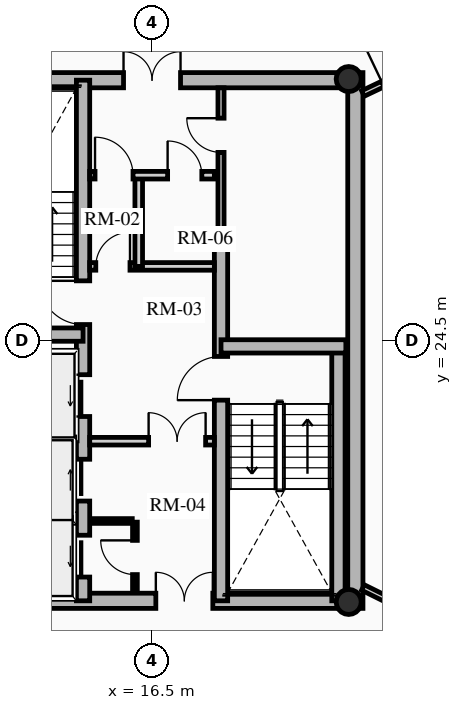
"""IFC4 building model, lengths in metres.
Left out: names, types, materials, properties, quantities, classifications, styles, units other than length and angle.
Written with IfcOpenShell. Run it as: python <this file> out.ifc"""

import sys

from ifc_helpers import new_model, si_unit, direction, frame, frame_2d, origin, origin_2d, place, context, subcontext, project, spatial, rectangle, hollow_circle, extrude, source, transform, mapped, element, fill, save


model = new_model("IFC4")
c1 = context("Model", 3, precision=1e-05, world=origin(), true_north=direction((0.0, 1.0)))
c2 = subcontext(c1, "Body", "Model", "MODEL_VIEW")
j1 = project(units=[si_unit("LENGTHUNIT", "METRE"), si_unit("PLANEANGLEUNIT", "RADIAN")], contexts=[c1])
p1 = place(None, origin())
s1 = spatial("IfcSite", under=j1, at=p1, CompositionType="ELEMENT")
p2 = place(p1, origin())
s2 = spatial("IfcBuilding", under=s1, at=p2, CompositionType="ELEMENT")
p3 = place(p2, frame((0.0, 0.0, 196.66)))
s3 = spatial("IfcBuildingStorey", under=s2, at=p3, CompositionType="ELEMENT", Elevation=196.66)
p4 = place(p3, frame((21.85, 17.45, 0.0), z_axis=(0.0, 0.0, 1.0), x_axis=(0.0, 1.0, 0.0)))
e1 = element("IfcWall", 1, at=p4, inside=s3, PredefinedType="SHEAR", context=c2, shape_type="SweptSolid", body=[
    extrude(rectangle(XDim=14.1, YDim=0.4, at=frame_2d((7.05, 0.0))), origin(), (0.0, 0.0, 1.0), 2.91),
])
p5 = place(p3, frame((11.15, 17.65, 0.0), z_axis=(0.0, 0.0, 1.0), x_axis=(1.0, 0.0, 0.0)))
e2 = element("IfcWall", 2, at=p5, inside=s3, PredefinedType="SHEAR", context=c2, shape_type="SweptSolid", body=[
    extrude(rectangle(XDim=10.7, YDim=0.4, at=frame_2d((5.35, 0.0))), origin(), (0.0, 0.0, 1.0), 2.91),
])
m1 = source(origin(), c2, "Body", "SweptSolid", [
    extrude(rectangle(XDim=1.5, YDim=2.02, at=frame_2d((0.75, 1.01))), frame((0.0, 0.21, 0.0), z_axis=(0.0, -1.0, 0.0), x_axis=(1.0, 0.0, 0.0)), (0.0, 0.0, 1.0), 0.42),
])
p6 = place(p5, frame((5.45, 0.0, 0.0)))
e3 = element("IfcOpeningElement", 3, at=p6, cuts=e2, PredefinedType="OPENING", context=c2, shape_type="MappedRepresentation", body=[
    mapped(m1, transform((0.0, 0.0, 0.0), x_axis=(1.0, 0.0, 0.0), y_axis=(0.0, 1.0, 0.0), z_axis=(0.0, 0.0, 1.0), scale=1.0)),
])
p7 = place(p3, frame((11.15, 31.35, 0.0), z_axis=(0.0, 0.0, 1.0), x_axis=(1.0, 0.0, 0.0)))
e4 = element("IfcWall", 4, at=p7, inside=s3, PredefinedType="SHEAR", context=c2, shape_type="SweptSolid", body=[
    extrude(rectangle(XDim=10.7, YDim=0.4, at=frame_2d((5.35, 0.0))), origin(), (0.0, 0.0, 1.0), 2.91),
])
p8 = place(p7, frame((4.6, 0.0, 0.0)))
e5 = element("IfcOpeningElement", 5, at=p8, cuts=e4, PredefinedType="OPENING", context=c2, shape_type="MappedRepresentation", body=[
    mapped(m1, transform((0.0, 0.0, 0.0), x_axis=(1.0, 0.0, 0.0), y_axis=(0.0, 1.0, 0.0), z_axis=(0.0, 0.0, 1.0), scale=1.0)),
])
p9 = place(p3, frame((14.685, 17.65, 0.0), z_axis=(0.0, 0.0, 1.0), x_axis=(0.0, 1.0, 0.0)))
e6 = element("IfcWall", 6, at=p9, inside=s3, PredefinedType="SHEAR", context=c2, shape_type="SweptSolid", body=[
    extrude(rectangle(XDim=13.7, YDim=0.35, at=frame_2d((6.85, 0.0))), origin(), (0.0, 0.0, 1.0), 2.91),
])
m2 = source(origin(), c2, "Body", "SweptSolid", [
    extrude(rectangle(XDim=1.1, YDim=2.015, at=frame_2d((0.55, 1.007))), frame((0.0, 0.185, 0.0), z_axis=(0.0, -1.0, 0.0), x_axis=(1.0, 0.0, 0.0)), (0.0, 0.0, 1.0), 0.37),
])
p10 = place(p9, frame((4.85, 0.0, 0.0)))
e7 = element("IfcOpeningElement", 7, at=p10, cuts=e6, PredefinedType="OPENING", context=c2, shape_type="MappedRepresentation", body=[
    mapped(m2, transform((0.0, 0.0, 0.0), x_axis=(1.0, 0.0, 0.0), y_axis=(0.0, 1.0, 0.0), z_axis=(0.0, 0.0, 1.0), scale=1.0)),
])
p11 = place(p9, frame((0.625, 0.0, 0.0)))
e8 = element("IfcOpeningElement", 8, at=p11, cuts=e6, PredefinedType="OPENING", context=c2, shape_type="MappedRepresentation", body=[
    mapped(m2, transform((0.0, 0.0, 0.0), x_axis=(1.0, 0.0, 0.0), y_axis=(0.0, 1.0, 0.0), z_axis=(0.0, 0.0, 1.0), scale=1.0)),
])
p12 = place(p9, frame((2.625, 0.0, 0.0)))
e9 = element("IfcOpeningElement", 9, at=p12, cuts=e6, PredefinedType="OPENING", context=c2, shape_type="MappedRepresentation", body=[
    mapped(m2, transform((0.0, 0.0, 0.0), x_axis=(1.0, 0.0, 0.0), y_axis=(0.0, 1.0, 0.0), z_axis=(0.0, 0.0, 1.0), scale=1.0)),
])
m3 = source(origin(), c2, "Body", "SweptSolid", [
    extrude(rectangle(XDim=1.15, YDim=2.02, at=frame_2d((0.575, 1.01))), frame((0.0, 0.185, 0.0), z_axis=(0.0, -1.0, 0.0), x_axis=(1.0, 0.0, 0.0)), (0.0, 0.0, 1.0), 0.37),
])
p13 = place(p9, frame((7.27, 0.0, 0.0)))
e10 = element("IfcOpeningElement", 10, at=p13, cuts=e6, PredefinedType="OPENING", context=c2, shape_type="MappedRepresentation", body=[
    mapped(m3, transform((0.0, 0.0, 0.0), x_axis=(1.0, 0.0, 0.0), y_axis=(0.0, 1.0, 0.0), z_axis=(0.0, 0.0, 1.0), scale=1.0)),
])
p14 = place(p3, frame((18.315, 17.65, 0.0), z_axis=(0.0, 0.0, 1.0), x_axis=(0.0, 1.0, 0.0)))
e11 = element("IfcWall", 11, at=p14, inside=s3, PredefinedType="SHEAR", context=c2, shape_type="SweptSolid", body=[
    extrude(rectangle(XDim=9.6, YDim=0.35, at=frame_2d((4.8, 0.0))), origin(), (0.0, 0.0, 1.0), 2.91),
])
p15 = place(p14, frame((5.28, 0.0, 0.0)))
e12 = element("IfcOpeningElement", 12, at=p15, cuts=e11, PredefinedType="OPENING", context=c2, shape_type="MappedRepresentation", body=[
    mapped(m3, transform((0.0, 0.0, 0.0), x_axis=(1.0, 0.0, 0.0), y_axis=(0.0, 1.0, 0.0), z_axis=(0.0, 0.0, 1.0), scale=1.0)),
])
p16 = place(p3, frame((11.4, 24.655, 0.0), z_axis=(0.0, 0.0, 1.0), x_axis=(1.0, 0.0, 0.0)))
e13 = element("IfcWall", 13, at=p16, inside=s3, PredefinedType="SHEAR", context=c2, shape_type="SweptSolid", body=[
    extrude(rectangle(XDim=3.285, YDim=0.35, at=frame_2d((1.643, 0.0))), origin(), (0.0, 0.0, 1.0), 2.91),
])
p17 = place(p3, frame((21.405, 17.65, 0.0), z_axis=(0.0, 0.0, 1.0), x_axis=(0.0, 1.0, 0.0)))
e14 = element("IfcWall", 14, at=p17, inside=s3, PredefinedType="SHEAR", context=c2, shape_type="SweptSolid", body=[
    extrude(rectangle(XDim=6.695, YDim=0.35, at=frame_2d((3.348, 0.0))), origin(), (0.0, 0.0, 1.0), 2.91),
])
p18 = place(p3, frame((18.315, 24.345, 0.0), z_axis=(0.0, 0.0, 1.0), x_axis=(1.0, 0.0, 0.0)))
e15 = element("IfcWall", 15, at=p18, inside=s3, PredefinedType="SHEAR", context=c2, shape_type="SweptSolid", body=[
    extrude(rectangle(XDim=3.285, YDim=0.35, at=frame_2d((1.643, 0.0))), origin(), (0.0, 0.0, 1.0), 2.91),
])
for number, where, z_axis, x_axis in (
    (16, (21.675, 17.62, 0.0), (0.0, 0.0, 1.0), (1.0, 0.0, 0.0)),
    (17, (21.675, 31.38, 0.0), (0.0, 0.0, 1.0), (1.0, 0.0, 0.0)),
):
    element("IfcColumn", number, at=place(p3, frame(where, z_axis=z_axis, x_axis=x_axis)), inside=s3, PredefinedType="COLUMN", context=c2, shape_type="SweptSolid", body=[
        extrude(hollow_circle(Radius=0.33, WallThickness=0.025, at=origin_2d()), origin(), (0.0, 0.0, 1.0), 2.91),
    ])
for number, where, z_axis, x_axis in (
    (18, (11.52, 21.8, 0.0), (0.0, 0.0, 1.0), (1.0, 0.0, 0.0)),
    (19, (11.52, 19.825, 0.0), (0.0, 0.0, 1.0), (1.0, 0.0, 0.0)),
):
    element("IfcWall", number, at=place(p3, frame(where, z_axis=z_axis, x_axis=x_axis)), inside=s3, PredefinedType="SHEAR", context=c2, shape_type="SweptSolid", body=[
        extrude(rectangle(XDim=2.97, YDim=0.2, at=frame_2d((1.485, 0.0))), origin(), (0.0, 0.0, 1.0), 2.91),
    ])
p19 = place(p3, frame((14.86, 21.85, 0.0), z_axis=(0.0, 0.0, 1.0), x_axis=(1.0, 0.0, 0.0)))
e20 = element("IfcWall", 20, at=p19, inside=s3, PredefinedType="PARTITIONING", context=c2, shape_type="SweptSolid", body=[
    extrude(rectangle(XDim=3.28, YDim=0.2, at=frame_2d((1.64, 0.0))), origin(), (0.0, 0.0, 1.0), 2.685),
])
m4 = source(origin(), c2, "Body", "SweptSolid", [
    extrude(rectangle(XDim=1.5, YDim=2.02, at=frame_2d((0.75, 1.01))), frame((0.0, 0.11, 0.0), z_axis=(0.0, -1.0, 0.0), x_axis=(1.0, 0.0, 0.0)), (0.0, 0.0, 1.0), 0.22),
])
p20 = place(p19, frame((1.55, 0.0, 0.0)))
e21 = element("IfcOpeningElement", 21, at=p20, cuts=e20, PredefinedType="OPENING", context=c2, shape_type="MappedRepresentation", body=[
    mapped(m4, transform((0.0, 0.0, 0.0), x_axis=(1.0, 0.0, 0.0), y_axis=(0.0, 1.0, 0.0), z_axis=(0.0, 0.0, 1.0), scale=1.0)),
])
p21 = place(p3, frame((14.86, 26.45, 0.0), z_axis=(0.0, 0.0, 1.0), x_axis=(1.0, 0.0, 0.0)))
e22 = element("IfcWall", 22, at=p21, inside=s3, PredefinedType="PARTITIONING", context=c2, shape_type="SweptSolid", body=[
    extrude(rectangle(XDim=3.28, YDim=0.2, at=frame_2d((1.64, 0.0))), origin(), (0.0, 0.0, 1.0), 2.685),
])
m5 = source(origin(), c2, "Body", "SweptSolid", [
    extrude(rectangle(XDim=0.9, YDim=2.005, at=frame_2d((0.45, 1.002))), frame((0.0, 0.11, 0.0), z_axis=(0.0, -1.0, 0.0), x_axis=(1.0, 0.0, 0.0)), (0.0, 0.0, 1.0), 0.22),
])
p22 = place(p21, frame((0.16, 0.0, 0.0)))
e23 = element("IfcOpeningElement", 23, at=p22, cuts=e22, PredefinedType="OPENING", context=c2, shape_type="MappedRepresentation", body=[
    mapped(m5, transform((0.0, 0.0, 0.0), x_axis=(1.0, 0.0, 0.0), y_axis=(0.0, 1.0, 0.0), z_axis=(0.0, 0.0, 1.0), scale=1.0)),
])
p23 = place(p3, frame((16.15, 26.45, 0.0), z_axis=(0.0, 0.0, 1.0), x_axis=(0.0, 1.0, 0.0)))
e24 = element("IfcWall", 24, at=p23, inside=s3, PredefinedType="PARTITIONING", context=c2, shape_type="SweptSolid", body=[
    extrude(rectangle(XDim=2.4, YDim=0.2, at=frame_2d((1.2, 0.0))), origin(), (0.0, 0.0, 1.0), 2.685),
])
p24 = place(p3, frame((14.86, 28.85, 0.0), z_axis=(0.0, 0.0, 1.0), x_axis=(1.0, 0.0, 0.0)))
e25 = element("IfcWall", 25, at=p24, inside=s3, PredefinedType="PARTITIONING", context=c2, shape_type="SweptSolid", body=[
    extrude(rectangle(XDim=3.28, YDim=0.2, at=frame_2d((1.64, 0.0))), origin(), (0.0, 0.0, 1.0), 2.685),
])
m6 = source(origin(), c2, "Body", "SweptSolid", [
    extrude(rectangle(XDim=1.0, YDim=2.015, at=frame_2d((0.5, 1.007))), frame((0.0, 0.11, 0.0), z_axis=(0.0, -1.0, 0.0), x_axis=(1.0, 0.0, 0.0)), (0.0, 0.0, 1.0), 0.22),
])
p25 = place(p24, frame((0.14, 0.0, 0.0)))
e26 = element("IfcOpeningElement", 26, at=p25, cuts=e25, PredefinedType="OPENING", context=c2, shape_type="MappedRepresentation", body=[
    mapped(m6, transform((0.0, 0.0, 0.0), x_axis=(1.0, 0.0, 0.0), y_axis=(0.0, 1.0, 0.0), z_axis=(0.0, 0.0, 1.0), scale=1.0)),
])
p26 = place(p24, frame((2.05, 0.0, 0.0)))
e27 = element("IfcOpeningElement", 27, at=p26, cuts=e25, PredefinedType="OPENING", context=c2, shape_type="MappedRepresentation", body=[
    mapped(m5, transform((0.0, 0.0, 0.0), x_axis=(1.0, 0.0, 0.0), y_axis=(0.0, 1.0, 0.0), z_axis=(0.0, 0.0, 1.0), scale=1.0)),
])
p27 = place(p3, frame((16.05, 17.92, 0.0), z_axis=(0.0, 0.0, 1.0), x_axis=(0.0, 1.0, 0.0)))
e28 = element("IfcWall", 28, at=p27, inside=s3, PredefinedType="PARTITIONING", context=c2, shape_type="SweptSolid", body=[
    extrude(rectangle(XDim=1.8, YDim=0.125, at=frame_2d((0.9, 0.0))), origin(), (0.0, 0.0, 1.0), 2.685),
])
m7 = source(origin(), c2, "Body", "SweptSolid", [
    extrude(rectangle(XDim=0.9, YDim=2.005, at=frame_2d((0.45, 1.002))), frame((0.0, 0.073, 0.0), z_axis=(0.0, -1.0, 0.0), x_axis=(1.0, 0.0, 0.0)), (0.0, 0.0, 1.0), 0.145),
])
p28 = place(p27, frame((0.42, 0.0, 0.0)))
e29 = element("IfcOpeningElement", 29, at=p28, cuts=e28, PredefinedType="OPENING", context=c2, shape_type="MappedRepresentation", body=[
    mapped(m7, transform((0.0, 0.0, 0.0), x_axis=(1.0, 0.0, 0.0), y_axis=(0.0, 1.0, 0.0), z_axis=(0.0, 0.0, 1.0), scale=1.0)),
])
p29 = place(p3, frame((14.88, 19.75, 0.0), z_axis=(0.0, 0.0, 1.0), x_axis=(1.0, 0.0, 0.0)))
e30 = element("IfcWall", 30, at=p29, inside=s3, PredefinedType="PARTITIONING", context=c2, shape_type="SweptSolid", body=[
    extrude(rectangle(XDim=1.1, YDim=0.125, at=frame_2d((0.55, 0.0))), origin(), (0.0, 0.0, 1.0), 2.685),
])
p30 = place(p3, frame((18.315, 27.25, 0.0), z_axis=(0.0, 0.0, 1.0), x_axis=(0.0, 1.0, 0.0)))
e31 = element("IfcWall", 31, at=p30, inside=s3, PredefinedType="PARTITIONING", context=c2, shape_type="SweptSolid", body=[
    extrude(rectangle(XDim=3.9, YDim=0.16, at=frame_2d((1.95, 0.0))), origin(), (0.0, 0.0, 1.0), 2.685),
])
m8 = source(origin(), c2, "Body", "SweptSolid", [
    extrude(rectangle(XDim=0.9, YDim=2.005, at=frame_2d((0.45, 1.002))), frame((0.0, 0.09, 0.0), z_axis=(0.0, -1.0, 0.0), x_axis=(1.0, 0.0, 0.0)), (0.0, 0.0, 1.0), 0.18),
])
p31 = place(p30, frame((2.2, 0.0, 0.0)))
e32 = element("IfcOpeningElement", 32, at=p31, cuts=e31, PredefinedType="OPENING", context=c2, shape_type="MappedRepresentation", body=[
    mapped(m8, transform((0.0, 0.0, 0.0), x_axis=(1.0, 0.0, 0.0), y_axis=(0.0, 1.0, 0.0), z_axis=(0.0, 0.0, 1.0), scale=1.0)),
])
p32 = place(p3, frame((22.05, 31.0, 0.0), z_axis=(0.0, 0.0, 1.0), x_axis=(0.903013459407, 0.429612257891, 0.0)))
e33 = element("IfcWall", 33, at=p32, inside=s3, PredefinedType="PARTITIONING", context=c2, shape_type="SweptSolid", body=[
    extrude(rectangle(XDim=1.829, YDim=0.16, at=frame_2d((0.914, 0.0))), origin(), (0.0, 0.0, 1.0), 2.255),
])
m9 = source(origin(), c2, "Body", "SweptSolid", [
    extrude(rectangle(XDim=1.05, YDim=2.015, at=frame_2d((0.525, 1.007))), frame((0.0, 0.09, 0.0), z_axis=(0.0, -1.0, 0.0), x_axis=(1.0, 0.0, 0.0)), (0.0, 0.0, 1.0), 0.18),
])
p33 = place(p32, frame((0.579, 0.0, 0.0)))
e34 = element("IfcOpeningElement", 34, at=p33, cuts=e33, PredefinedType="OPENING", context=c2, shape_type="MappedRepresentation", body=[
    mapped(m9, transform((0.0, 0.0, 0.0), x_axis=(1.0, 0.0, 0.0), y_axis=(0.0, 1.0, 0.0), z_axis=(0.0, 0.0, 1.0), scale=1.0)),
])
p34 = place(p3, frame((22.05, 18.0, 0.0), z_axis=(0.0, 0.0, 1.0), x_axis=(0.896045848613, -0.443961526692, 0.0)))
e35 = element("IfcWall", 35, at=p34, inside=s3, PredefinedType="PARTITIONING", context=c2, shape_type="SweptSolid", body=[
    extrude(rectangle(XDim=1.924, YDim=0.16, at=frame_2d((0.962, 0.0))), origin(), (0.0, 0.0, 1.0), 2.255),
])
p35 = place(p34, frame((0.674, 0.0, 0.0)))
e36 = element("IfcOpeningElement", 36, at=p35, cuts=e35, PredefinedType="OPENING", context=c2, shape_type="MappedRepresentation", body=[
    mapped(m9, transform((0.0, 0.0, 0.0), x_axis=(1.0, 0.0, 0.0), y_axis=(0.0, 1.0, 0.0), z_axis=(0.0, 0.0, 1.0), scale=1.0)),
])
m10 = source(origin(), c2, "Body", "SweptSolid", [
    extrude(rectangle(XDim=1.1, YDim=2.015, at=frame_2d((0.55, 1.007))), frame((0.0, 0.025, 0.0), z_axis=(0.0, -1.0, 0.0), x_axis=(1.0, 0.0, 0.0)), (0.0, 0.0, 1.0), 0.05),
])
p36 = place(p10, origin())
e37 = element("IfcDoor", 37, at=p36, inside=s3, OperationType="SLIDING_TO_LEFT", PredefinedType="DOOR", context=c2, shape_type="MappedRepresentation", body=[
    mapped(m10, transform((0.0, 0.0, 0.0), x_axis=(1.0, 0.0, 0.0), y_axis=(0.0, 1.0, 0.0), z_axis=(0.0, 0.0, 1.0), scale=1.0)),
])
fill(e7, e37)
p37 = place(p11, origin())
e38 = element("IfcDoor", 38, at=p37, inside=s3, OperationType="SLIDING_TO_LEFT", PredefinedType="DOOR", context=c2, shape_type="MappedRepresentation", body=[
    mapped(m10, transform((0.0, 0.0, 0.0), x_axis=(1.0, 0.0, 0.0), y_axis=(0.0, 1.0, 0.0), z_axis=(0.0, 0.0, 1.0), scale=1.0)),
])
fill(e8, e38)
p38 = place(p12, origin())
e39 = element("IfcDoor", 39, at=p38, inside=s3, OperationType="SLIDING_TO_RIGHT", PredefinedType="DOOR", context=c2, shape_type="MappedRepresentation", body=[
    mapped(m10, transform((0.0, 0.0, 0.0), x_axis=(1.0, 0.0, 0.0), y_axis=(0.0, 1.0, 0.0), z_axis=(0.0, 0.0, 1.0), scale=1.0)),
])
fill(e9, e39)
m11 = source(origin(), c2, "Body", "SweptSolid", [
    extrude(rectangle(XDim=1.15, YDim=2.02, at=frame_2d((0.575, 1.01))), frame((0.0, 0.025, 0.0), z_axis=(0.0, -1.0, 0.0), x_axis=(1.0, 0.0, 0.0)), (0.0, 0.0, 1.0), 0.05),
])
p39 = place(p13, origin())
e40 = element("IfcDoor", 40, at=p39, inside=s3, OperationType="SINGLE_SWING_RIGHT", PredefinedType="DOOR", context=c2, shape_type="MappedRepresentation", body=[
    mapped(m11, transform((0.0, 0.0, 0.0), x_axis=(1.0, 0.0, 0.0), y_axis=(0.0, 1.0, 0.0), z_axis=(0.0, 0.0, 1.0), scale=1.0)),
])
fill(e10, e40)
p40 = place(p15, origin())
e41 = element("IfcDoor", 41, at=p40, inside=s3, OperationType="SINGLE_SWING_LEFT", PredefinedType="DOOR", context=c2, shape_type="MappedRepresentation", body=[
    mapped(m11, transform((0.0, 0.0, 0.0), x_axis=(1.0, 0.0, 0.0), y_axis=(0.0, 1.0, 0.0), z_axis=(0.0, 0.0, 1.0), scale=1.0)),
])
fill(e12, e41)
m12 = source(origin(), c2, "Body", "SweptSolid", [
    extrude(rectangle(XDim=1.5, YDim=2.02, at=frame_2d((0.75, 1.01))), frame((0.0, 0.025, 0.0), z_axis=(0.0, -1.0, 0.0), x_axis=(1.0, 0.0, 0.0)), (0.0, 0.0, 1.0), 0.05),
])
p41 = place(p8, origin())
e42 = element("IfcDoor", 42, at=p41, inside=s3, OperationType="DOUBLE_DOOR_SINGLE_SWING", PredefinedType="DOOR", context=c2, shape_type="MappedRepresentation", body=[
    mapped(m12, transform((0.0, 0.0, 0.0), x_axis=(1.0, 0.0, 0.0), y_axis=(0.0, 1.0, 0.0), z_axis=(0.0, 0.0, 1.0), scale=1.0)),
])
fill(e5, e42)
p42 = place(p6, origin())
e43 = element("IfcDoor", 43, at=p42, inside=s3, OperationType="DOUBLE_DOOR_SINGLE_SWING", PredefinedType="DOOR", context=c2, shape_type="MappedRepresentation", body=[
    mapped(m12, transform((0.0, 0.0, 0.0), x_axis=(1.0, 0.0, 0.0), y_axis=(0.0, 1.0, 0.0), z_axis=(0.0, 0.0, 1.0), scale=1.0)),
])
fill(e3, e43)
p43 = place(p20, origin())
e44 = element("IfcDoor", 44, at=p43, inside=s3, OperationType="DOUBLE_DOOR_SINGLE_SWING", PredefinedType="DOOR", context=c2, shape_type="MappedRepresentation", body=[
    mapped(m12, transform((0.0, 0.0, 0.0), x_axis=(1.0, 0.0, 0.0), y_axis=(0.0, 1.0, 0.0), z_axis=(0.0, 0.0, 1.0), scale=1.0)),
])
fill(e21, e44)
m13 = source(origin(), c2, "Body", "SweptSolid", [
    extrude(rectangle(XDim=0.9, YDim=2.005, at=frame_2d((0.45, 1.002))), frame((0.0, 0.025, 0.0), z_axis=(0.0, -1.0, 0.0), x_axis=(1.0, 0.0, 0.0)), (0.0, 0.0, 1.0), 0.05),
])
p44 = place(p22, origin())
e45 = element("IfcDoor", 45, at=p44, inside=s3, OperationType="SINGLE_SWING_RIGHT", PredefinedType="DOOR", context=c2, shape_type="MappedRepresentation", body=[
    mapped(m13, transform((0.0, 0.0, 0.0), x_axis=(1.0, 0.0, 0.0), y_axis=(0.0, 1.0, 0.0), z_axis=(0.0, 0.0, 1.0), scale=1.0)),
])
fill(e23, e45)
m14 = source(origin(), c2, "Body", "SweptSolid", [
    extrude(rectangle(XDim=1.0, YDim=2.015, at=frame_2d((0.5, 1.007))), frame((0.0, 0.025, 0.0), z_axis=(0.0, -1.0, 0.0), x_axis=(1.0, 0.0, 0.0)), (0.0, 0.0, 1.0), 0.05),
])
p45 = place(p25, origin())
e46 = element("IfcDoor", 46, at=p45, inside=s3, OperationType="SINGLE_SWING_LEFT", PredefinedType="DOOR", context=c2, shape_type="MappedRepresentation", body=[
    mapped(m14, transform((0.0, 0.0, 0.0), x_axis=(1.0, 0.0, 0.0), y_axis=(0.0, 1.0, 0.0), z_axis=(0.0, 0.0, 1.0), scale=1.0)),
])
fill(e26, e46)
p46 = place(p28, origin())
e47 = element("IfcDoor", 47, at=p46, inside=s3, OperationType="SINGLE_SWING_RIGHT", PredefinedType="DOOR", context=c2, shape_type="MappedRepresentation", body=[
    mapped(m13, transform((0.0, 0.0, 0.0), x_axis=(1.0, 0.0, 0.0), y_axis=(0.0, 1.0, 0.0), z_axis=(0.0, 0.0, 1.0), scale=1.0)),
])
fill(e29, e47)
p47 = place(p26, origin())
e48 = element("IfcDoor", 48, at=p47, inside=s3, OperationType="SINGLE_SWING_LEFT", PredefinedType="DOOR", context=c2, shape_type="MappedRepresentation", body=[
    mapped(m13, transform((0.0, 0.0, 0.0), x_axis=(1.0, 0.0, 0.0), y_axis=(0.0, 1.0, 0.0), z_axis=(0.0, 0.0, 1.0), scale=1.0)),
])
fill(e27, e48)
p48 = place(p31, origin())
e49 = element("IfcDoor", 49, at=p48, inside=s3, OperationType="SINGLE_SWING_RIGHT", PredefinedType="DOOR", context=c2, shape_type="MappedRepresentation", body=[
    mapped(m13, transform((0.0, 0.0, 0.0), x_axis=(1.0, 0.0, 0.0), y_axis=(0.0, 1.0, 0.0), z_axis=(0.0, 0.0, 1.0), scale=1.0)),
])
fill(e32, e49)
save(model, sys.argv[1])
